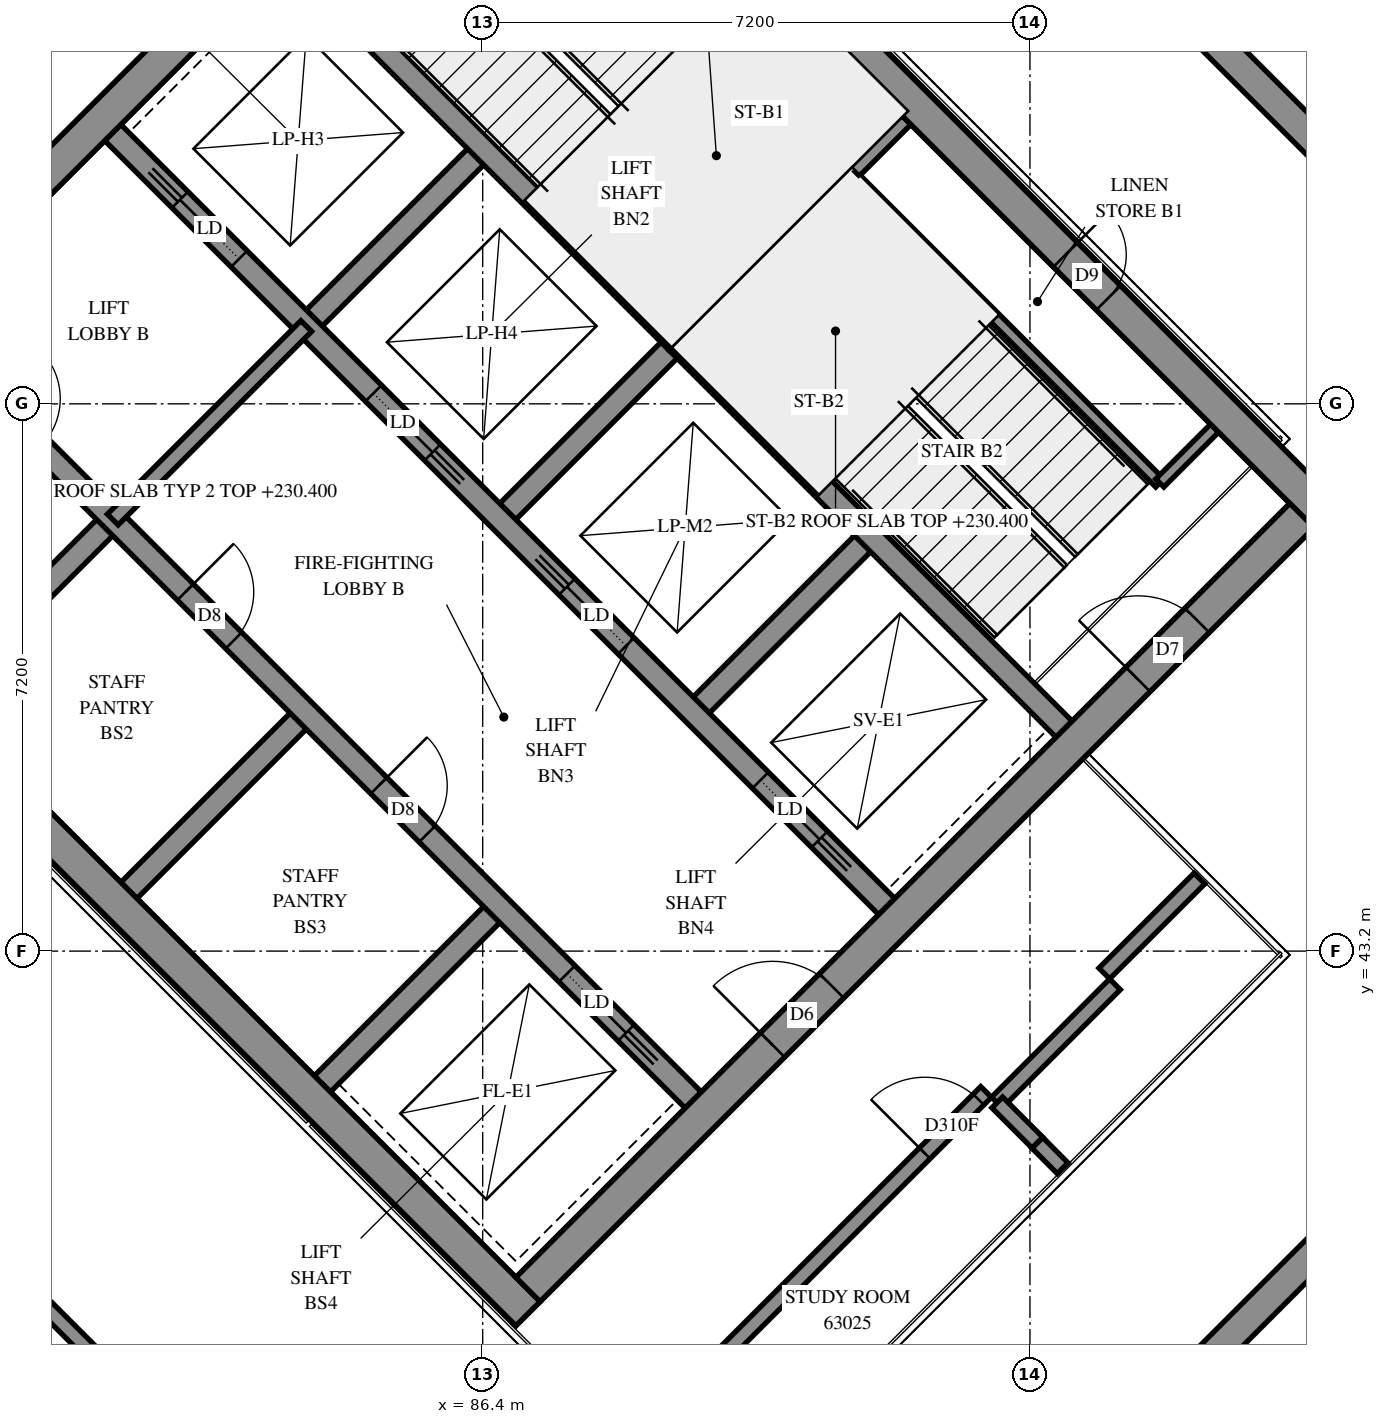
"""IFC4 building model, lengths in metres.
Left out: names, types, materials, properties, quantities, classifications, styles, units other than length and angle.
Written with IfcOpenShell. Run it as: python <this file> out.ifc"""

import sys

from ifc_helpers import new_model, si_unit, direction, frame, frame_2d, origin, place, context, subcontext, project, spatial, polyline, rectangle, outline, extrude, element, fill, save


model = new_model("IFC4")
c1 = context("Model", 3, precision=1e-05, world=origin(), true_north=direction((0.0, 1.0)))
c2 = subcontext(c1, "Body", "Model", "MODEL_VIEW")
j1 = project(units=[si_unit("LENGTHUNIT", "METRE"), si_unit("PLANEANGLEUNIT", "RADIAN")], contexts=[c1])
p1 = place(None, origin())
s1 = spatial("IfcSite", under=j1, at=p1, CompositionType="ELEMENT")
p2 = place(p1, origin())
s2 = spatial("IfcBuilding", under=s1, at=p2, CompositionType="ELEMENT")
p3 = place(p2, frame((0.0, 0.0, 230.4)))
s3 = spatial("IfcBuildingStorey", under=s2, at=p3, CompositionType="ELEMENT", Elevation=230.4)
p4 = place(p3, frame((76.177, 49.249, -0.3), z_axis=(0.0, 0.0, 1.0), x_axis=(0.7071100491, -0.7071035132, 0.0)))
e1 = element("IfcWall", 1, at=p4, inside=s3, PredefinedType="SHEAR", context=c2, shape_type="SweptSolid", body=[
    extrude(rectangle(XDim=15.3, YDim=0.45, at=frame_2d((7.65, 0.0))), origin(), (0.0, 0.0, 1.0), 3.5),
])
p5 = place(p3, frame((86.678, 59.749, -0.3), z_axis=(0.0, 0.0, 1.0), x_axis=(0.7071035132, -0.7071100491, 0.0)))
e2 = element("IfcWall", 2, at=p5, inside=s3, PredefinedType="SHEAR", context=c2, shape_type="SweptSolid", body=[
    extrude(rectangle(XDim=15.3, YDim=0.45, at=frame_2d((7.65, 0.0))), origin(), (0.0, 0.0, 1.0), 3.5),
])
p6 = place(p5, frame((10.45, 0.0, 0.3)))
e3 = element("IfcOpeningElement", 3, at=p6, cuts=e2, PredefinedType="OPENING", context=c2, shape_type="SweptSolid", body=[
    extrude(rectangle(XDim=0.8, YDim=2.1, at=frame_2d((0.4, 1.05))), frame((0.0, 0.235, 0.0), z_axis=(0.0, -1.0, 0.0), x_axis=(1.0, 0.0, 0.0)), (0.0, 0.0, 1.0), 0.47),
])
p7 = place(p3, frame((76.495, 49.249, -0.3), z_axis=(0.0, 0.0, 1.0), x_axis=(0.7071067812, 0.7071067812, 0.0)))
e4 = element("IfcWall", 4, at=p7, inside=s3, PredefinedType="SHEAR", context=c2, shape_type="SweptSolid", body=[
    extrude(rectangle(XDim=14.4, YDim=0.45, at=frame_2d((7.2, 0.0))), origin(), (0.0, 0.0, 1.0), 3.5),
])
p8 = place(p7, frame((4.55, 0.0, 0.3)))
e5 = element("IfcOpeningElement", 5, at=p8, cuts=e4, PredefinedType="OPENING", context=c2, shape_type="SweptSolid", body=[
    extrude(rectangle(XDim=1.1, YDim=2.1, at=frame_2d((0.55, 1.05))), frame((0.0, 0.235, 0.0), z_axis=(0.0, -1.0, 0.0), x_axis=(1.0, 0.0, 0.0)), (0.0, 0.0, 1.0), 0.47),
])
p9 = place(p7, frame((11.35, 0.0, 0.3)))
e6 = element("IfcOpeningElement", 6, at=p9, cuts=e4, PredefinedType="OPENING", context=c2, shape_type="SweptSolid", body=[
    extrude(rectangle(XDim=1.1, YDim=2.1, at=frame_2d((0.55, 1.05))), frame((0.0, 0.235, 0.0), z_axis=(0.0, -1.0, 0.0), x_axis=(1.0, 0.0, 0.0)), (0.0, 0.0, 1.0), 0.47),
])
p10 = place(p3, frame((86.996, 38.748, -0.3), z_axis=(0.0, 0.0, 1.0), x_axis=(0.7071067812, 0.7071067812, 0.0)))
e7 = element("IfcWall", 7, at=p10, inside=s3, PredefinedType="SHEAR", context=c2, shape_type="SweptSolid", body=[
    extrude(rectangle(XDim=14.4, YDim=0.45, at=frame_2d((7.2, 0.0))), origin(), (0.0, 0.0, 1.0), 3.5),
])
p11 = place(p10, frame((4.55, 0.0, 0.3)))
e8 = element("IfcOpeningElement", 8, at=p11, cuts=e7, PredefinedType="OPENING", context=c2, shape_type="SweptSolid", body=[
    extrude(rectangle(XDim=1.1, YDim=2.1, at=frame_2d((0.55, 1.05))), frame((0.0, 0.235, 0.0), z_axis=(0.0, -1.0, 0.0), x_axis=(1.0, 0.0, 0.0)), (0.0, 0.0, 1.0), 0.47),
])
p12 = place(p10, frame((11.35, 0.0, 0.3)))
e9 = element("IfcOpeningElement", 9, at=p12, cuts=e7, PredefinedType="OPENING", context=c2, shape_type="SweptSolid", body=[
    extrude(rectangle(XDim=1.1, YDim=2.1, at=frame_2d((0.55, 1.05))), frame((0.0, 0.235, 0.0), z_axis=(0.0, -1.0, 0.0), x_axis=(1.0, 0.0, 0.0)), (0.0, 0.0, 1.0), 0.47),
])
for number, where, z_axis, x_axis in (
    (10, (79.2, 46.544, 0.0), (0.0, 0.0, 1.0), (0.707, 0.707, 0.0)),
    (11, (84.079, 51.423, 0.0), (0.0, 0.0, 1.0), (0.707, 0.707, 0.0)),
):
    element("IfcWall", number, at=place(p3, frame(where, z_axis=z_axis, x_axis=x_axis)), inside=s3, PredefinedType="SOLIDWALL", context=c2, shape_type="SweptSolid", body=[
        extrude(rectangle(XDim=3.3, YDim=0.3, at=frame_2d((1.65, 0.0))), origin(), (0.0, 0.0, 1.0), 3.9),
    ])
p13 = place(p3, frame((81.746, 43.999, 0.0), z_axis=(0.0, 0.0, 1.0), x_axis=(0.7071067812, 0.7071067812, 0.0)))
e12 = element("IfcWall", 12, at=p13, inside=s3, PredefinedType="SOLIDWALL", context=c2, shape_type="SweptSolid", body=[
    extrude(rectangle(XDim=3.3, YDim=0.3, at=frame_2d((1.65, 0.0))), origin(), (0.0, 0.0, 1.0), 3.9),
])
p14 = place(p3, frame((86.625, 48.878, 0.0), z_axis=(0.0, 0.0, 1.0), x_axis=(0.7071067812, 0.7071067812, 0.0)))
e13 = element("IfcWall", 13, at=p14, inside=s3, PredefinedType="SOLIDWALL", context=c2, shape_type="SweptSolid", body=[
    extrude(rectangle(XDim=3.3, YDim=0.3, at=frame_2d((1.65, 0.0))), origin(), (0.0, 0.0, 1.0), 3.9),
])
p15 = place(p3, frame((84.291, 41.453, 0.0), z_axis=(0.0, 0.0, 1.0), x_axis=(0.7071067812, 0.7071067812, 0.0)))
e14 = element("IfcWall", 14, at=p15, inside=s3, PredefinedType="SOLIDWALL", context=c2, shape_type="SweptSolid", body=[
    extrude(rectangle(XDim=3.3, YDim=0.3, at=frame_2d((1.65, 0.0))), origin(), (0.0, 0.0, 1.0), 3.9),
])
p16 = place(p3, frame((89.17, 46.332, 0.0), z_axis=(0.0, 0.0, 1.0), x_axis=(0.7071067812, 0.7071067812, 0.0)))
e15 = element("IfcWall", 15, at=p16, inside=s3, PredefinedType="SOLIDWALL", context=c2, shape_type="SweptSolid", body=[
    extrude(rectangle(XDim=3.3, YDim=0.3, at=frame_2d((1.65, 0.0))), origin(), (0.0, 0.0, 1.0), 3.9),
])
p17 = place(p3, frame((78.988, 51.423, 0.0), z_axis=(0.0, 0.0, 1.0), x_axis=(0.7071067812, -0.7071067812, 0.0)))
e16 = element("IfcWall", 16, at=p17, inside=s3, PredefinedType="SOLIDWALL", context=c2, shape_type="SweptSolid", body=[
    extrude(rectangle(XDim=14.4, YDim=0.3, at=frame_2d((7.2, 0.0))), origin(), (0.0, 0.0, 1.0), 3.9),
])
p18 = place(p17, frame((1.35, 0.0, 0.0)))
e17 = element("IfcOpeningElement", 17, at=p18, cuts=e16, PredefinedType="OPENING", context=c2, shape_type="SweptSolid", body=[
    extrude(rectangle(XDim=0.9, YDim=2.1, at=frame_2d((0.45, 1.05))), frame((0.0, 0.16, 0.0), z_axis=(0.0, -1.0, 0.0), x_axis=(1.0, 0.0, 0.0)), (0.0, 0.0, 1.0), 0.32),
])
p19 = place(p17, frame((4.95, 0.0, 0.0)))
e18 = element("IfcOpeningElement", 18, at=p19, cuts=e16, PredefinedType="OPENING", context=c2, shape_type="SweptSolid", body=[
    extrude(rectangle(XDim=0.9, YDim=2.1, at=frame_2d((0.45, 1.05))), frame((0.0, 0.16, 0.0), z_axis=(0.0, -1.0, 0.0), x_axis=(1.0, 0.0, 0.0)), (0.0, 0.0, 1.0), 0.32),
])
p20 = place(p17, frame((8.55, 0.0, 0.0)))
e19 = element("IfcOpeningElement", 19, at=p20, cuts=e16, PredefinedType="OPENING", context=c2, shape_type="SweptSolid", body=[
    extrude(rectangle(XDim=0.9, YDim=2.1, at=frame_2d((0.45, 1.05))), frame((0.0, 0.16, 0.0), z_axis=(0.0, -1.0, 0.0), x_axis=(1.0, 0.0, 0.0)), (0.0, 0.0, 1.0), 0.32),
])
p21 = place(p17, frame((12.05, 0.0, 0.0)))
e20 = element("IfcOpeningElement", 20, at=p21, cuts=e16, PredefinedType="OPENING", context=c2, shape_type="SweptSolid", body=[
    extrude(rectangle(XDim=1.1, YDim=2.1, at=frame_2d((0.55, 1.05))), frame((0.0, 0.16, 0.0), z_axis=(0.0, -1.0, 0.0), x_axis=(1.0, 0.0, 0.0)), (0.0, 0.0, 1.0), 0.32),
])
p22 = place(p3, frame((81.534, 53.969, 0.0), z_axis=(0.0, 0.0, 1.0), x_axis=(0.707103309, -0.7071102534, 0.0)))
e21 = element("IfcWall", 21, at=p22, inside=s3, PredefinedType="SOLIDWALL", context=c2, shape_type="SweptSolid", body=[
    extrude(rectangle(XDim=14.4, YDim=0.3, at=frame_2d((7.2, 0.0))), origin(), (0.0, 0.0, 1.0), 3.9),
])
p23 = place(p22, frame((1.25, 0.0, 0.0)))
e22 = element("IfcOpeningElement", 22, at=p23, cuts=e21, PredefinedType="OPENING", context=c2, shape_type="SweptSolid", body=[
    extrude(rectangle(XDim=1.1, YDim=2.1, at=frame_2d((0.55, 1.05))), frame((0.0, 0.16, 0.0), z_axis=(0.0, -1.0, 0.0), x_axis=(1.0, 0.0, 0.0)), (0.0, 0.0, 1.0), 0.32),
])
p24 = place(p22, frame((4.85, 0.0, 0.0)))
e23 = element("IfcOpeningElement", 23, at=p24, cuts=e21, PredefinedType="OPENING", context=c2, shape_type="SweptSolid", body=[
    extrude(rectangle(XDim=1.1, YDim=2.1, at=frame_2d((0.55, 1.05))), frame((0.0, 0.16, 0.0), z_axis=(0.0, -1.0, 0.0), x_axis=(1.0, 0.0, 0.0)), (0.0, 0.0, 1.0), 0.32),
])
p25 = place(p22, frame((8.45, 0.0, 0.0)))
e24 = element("IfcOpeningElement", 24, at=p25, cuts=e21, PredefinedType="OPENING", context=c2, shape_type="SweptSolid", body=[
    extrude(rectangle(XDim=1.1, YDim=2.1, at=frame_2d((0.55, 1.05))), frame((0.0, 0.16, 0.0), z_axis=(0.0, -1.0, 0.0), x_axis=(1.0, 0.0, 0.0)), (0.0, 0.0, 1.0), 0.32),
])
p26 = place(p22, frame((12.05, 0.0, 0.0)))
e25 = element("IfcOpeningElement", 25, at=p26, cuts=e21, PredefinedType="OPENING", context=c2, shape_type="SweptSolid", body=[
    extrude(rectangle(XDim=1.1, YDim=2.1, at=frame_2d((0.55, 1.05))), frame((0.0, 0.16, 0.0), z_axis=(0.0, -1.0, 0.0), x_axis=(1.0, 0.0, 0.0)), (0.0, 0.0, 1.0), 0.32),
])
for number, where, z_axis, x_axis in (
    (26, (83.867, 56.302, 0.0), (0.0, 0.0, 1.0), (0.707, -0.707, 0.0)),
    (27, (88.958, 51.211, 0.0), (0.0, 0.0, 1.0), (0.707, -0.707, 0.0)),
):
    element("IfcWall", number, at=place(p3, frame(where, z_axis=z_axis, x_axis=x_axis)), inside=s3, PredefinedType="SOLIDWALL", context=c2, shape_type="SweptSolid", body=[
        extrude(rectangle(XDim=7.2, YDim=0.3, at=frame_2d((3.6, 0.0))), origin(), (0.0, 0.0, 1.0), 3.9),
    ])
p27 = place(p3, frame((88.958, 51.211, 0.0), z_axis=(0.0, 0.0, 1.0), x_axis=(0.7071067812, 0.7071067812, 0.0)))
e28 = element("IfcWall", 28, at=p27, inside=s3, PredefinedType="SOLIDWALL", context=c2, shape_type="SweptSolid", body=[
    extrude(rectangle(XDim=4.2, YDim=0.3, at=frame_2d((2.1, 0.0))), origin(), (0.0, 0.0, 1.0), 3.9),
])
p28 = place(p3, frame((102.747, 49.938, 0.0), z_axis=(0.0, 0.0, 1.0), x_axis=(-0.7071083109, 0.7071052514, 0.0)))
e29 = element("IfcWall", 29, at=p28, inside=s3, PredefinedType="SOLIDWALL", context=c2, shape_type="SweptSolid", body=[
    extrude(outline(polyline([(-0.1, -0.1), (32.726, -0.1), (32.644, 0.1), (0.1, 0.1), (-0.1, -0.1)])), origin(), (0.0, 0.0, 1.0), 4.2),
])
p29 = place(p3, frame((77.018, 42.15, 0.0), z_axis=(0.0, 0.0, 1.0), x_axis=(0.7071039217, -0.7071096407, 0.0)))
e30 = element("IfcWall", 30, at=p29, inside=s3, PredefinedType="SOLIDWALL", context=c2, shape_type="SweptSolid", body=[
    extrude(outline(polyline([(0.041, -0.1), (17.586, -0.1), (17.386, 0.1), (-0.041, 0.1), (0.041, -0.1)])), origin(), (0.0, 0.0, 1.0), 4.2),
])
p30 = place(p3, frame((89.382, 29.786, 0.0), z_axis=(0.0, 0.0, 1.0), x_axis=(0.7071094267, 0.7071041357, 0.0)))
e31 = element("IfcWall", 31, at=p30, inside=s3, PredefinedType="SOLIDWALL", context=c2, shape_type="SweptSolid", body=[
    extrude(outline(polyline([(-0.1, -0.1), (19.0, -0.1), (18.8, 0.1), (0.1, 0.1), (-0.1, -0.1)])), origin(), (0.0, 0.0, 1.0), 4.2),
])
p31 = place(p3, frame((91.313, 53.354, 0.0), z_axis=(0.0, 0.0, 1.0), x_axis=(0.7071067812, -0.7071067812, 0.0)))
e32 = element("IfcWall", 32, at=p31, inside=s3, PredefinedType="PARTITIONING", context=c2, shape_type="SweptSolid", body=[
    extrude(rectangle(XDim=5.65, YDim=0.15, at=frame_2d((2.825, 0.0))), origin(), (0.0, 0.0, 1.0), 3.9),
])
p32 = place(p3, frame((95.308, 49.358, 0.0), z_axis=(0.0, 0.0, 1.0), x_axis=(0.70705776, 0.707155799, 0.0)))
e33 = element("IfcWall", 33, at=p32, inside=s3, PredefinedType="PARTITIONING", context=c2, shape_type="SweptSolid", body=[
    extrude(rectangle(XDim=1.02, YDim=0.15, at=frame_2d((0.51, 0.0))), origin(), (0.0, 0.0, 1.0), 3.9),
])
p33 = place(p3, frame((81.534, 48.878, 0.0), z_axis=(0.0, 0.0, 1.0), x_axis=(0.707092892, 0.7071206701, 0.0)))
e34 = element("IfcWall", 34, at=p33, inside=s3, PredefinedType="PARTITIONING", context=c2, shape_type="SweptSolid", body=[
    extrude(rectangle(XDim=3.6, YDim=0.2, at=frame_2d((1.8, 0.0))), origin(), (0.0, 0.0, 1.0), 3.9),
])
p34 = place(p3, frame((88.377, 36.701, 0.0), z_axis=(0.0, 0.0, 1.0), x_axis=(0.7071067812, 0.7071067812, 0.0)))
e35 = element("IfcWall", 35, at=p34, inside=s3, PredefinedType="PARTITIONING", context=c2, shape_type="SweptSolid", body=[
    extrude(rectangle(XDim=6.57, YDim=0.2, at=frame_2d((3.285, 0.0))), origin(), (0.0, 0.0, 1.0), 3.9),
])
p35 = place(p34, frame((5.43, 0.0, 0.0)))
e36 = element("IfcOpeningElement", 36, at=p35, cuts=e35, PredefinedType="OPENING", context=c2, shape_type="SweptSolid", body=[
    extrude(rectangle(XDim=1.0, YDim=2.1, at=frame_2d((0.5, 1.05))), frame((0.0, 0.11, 0.0), z_axis=(0.0, -1.0, 0.0), x_axis=(1.0, 0.0, 0.0)), (0.0, 0.0, 1.0), 0.22),
])
p36 = place(p3, frame((93.164, 41.208, 0.0), z_axis=(0.0, 0.0, 1.0), x_axis=(0.706651904, 0.7075613659, 0.0)))
e37 = element("IfcWall", 37, at=p36, inside=s3, PredefinedType="PARTITIONING", context=c2, shape_type="SweptSolid", body=[
    extrude(rectangle(XDim=2.199, YDim=0.2, at=frame_2d((1.1, 0.0))), origin(), (0.0, 0.0, 1.0), 3.9),
])
p37 = place(p3, frame((94.578, 42.906, 0.0), z_axis=(0.0, 0.0, 1.0), x_axis=(0.7076717883, 0.7065413222, 0.0)))
e38 = element("IfcWall", 38, at=p37, inside=s3, PredefinedType="PARTITIONING", context=c2, shape_type="SweptSolid", body=[
    extrude(rectangle(XDim=1.769, YDim=0.2, at=frame_2d((0.885, 0.0))), origin(), (0.0, 0.0, 1.0), 3.9),
])
p38 = place(p3, frame((93.169, 41.209, 0.0), z_axis=(0.0, 0.0, 1.0), x_axis=(0.7071067812, -0.7071067812, 0.0)))
e39 = element("IfcWall", 39, at=p38, inside=s3, PredefinedType="PARTITIONING", context=c2, shape_type="SweptSolid", body=[
    extrude(rectangle(XDim=0.75, YDim=0.2, at=frame_2d((0.375, 0.0))), origin(), (0.0, 0.0, 1.0), 3.9),
])
p39 = place(p3, frame((93.698, 40.678, 0.0), z_axis=(0.0, 0.0, 1.0), x_axis=(0.7049801586, -0.7092270271, 0.0)))
e40 = element("IfcWall", 40, at=p39, inside=s3, PredefinedType="PARTITIONING", context=c2, shape_type="SweptSolid", body=[
    extrude(rectangle(XDim=0.471, YDim=0.2, at=frame_2d((0.235, 0.0))), origin(), (0.0, 0.0, 1.0), 3.9),
])
p40 = place(p6, origin())
e41 = element("IfcDoor", 41, at=p40, inside=s3, OperationType="SINGLE_SWING_RIGHT", PredefinedType="DOOR", context=c2, shape_type="SweptSolid", body=[
    extrude(rectangle(XDim=0.8, YDim=2.1, at=frame_2d((0.4, 1.05))), frame((0.0, 0.025, 0.0), z_axis=(0.0, -1.0, 0.0), x_axis=(1.0, 0.0, 0.0)), (0.0, 0.0, 1.0), 0.05),
])
fill(e3, e41)
p41 = place(p11, origin())
e42 = element("IfcDoor", 42, at=p41, inside=s3, OperationType="DOUBLE_DOOR_SINGLE_SWING", PredefinedType="DOOR", context=c2, shape_type="SweptSolid", body=[
    extrude(rectangle(XDim=1.1, YDim=2.1, at=frame_2d((0.55, 1.05))), frame((0.0, 0.025, 0.0), z_axis=(0.0, -1.0, 0.0), x_axis=(1.0, 0.0, 0.0)), (0.0, 0.0, 1.0), 0.05),
])
fill(e8, e42)
p42 = place(p12, origin())
e43 = element("IfcDoor", 43, at=p42, inside=s3, OperationType="SINGLE_SWING_RIGHT", PredefinedType="DOOR", context=c2, shape_type="SweptSolid", body=[
    extrude(rectangle(XDim=1.1, YDim=2.1, at=frame_2d((0.55, 1.05))), frame((0.0, 0.025, 0.0), z_axis=(0.0, -1.0, 0.0), x_axis=(1.0, 0.0, 0.0)), (0.0, 0.0, 1.0), 0.05),
])
fill(e9, e43)
p43 = place(p19, origin())
e44 = element("IfcDoor", 44, at=p43, inside=s3, OperationType="SINGLE_SWING_LEFT", PredefinedType="DOOR", context=c2, shape_type="SweptSolid", body=[
    extrude(rectangle(XDim=0.9, YDim=2.1, at=frame_2d((0.45, 1.05))), frame((0.0, 0.025, 0.0), z_axis=(0.0, -1.0, 0.0), x_axis=(1.0, 0.0, 0.0)), (0.0, 0.0, 1.0), 0.05),
])
fill(e18, e44)
p44 = place(p20, origin())
e45 = element("IfcDoor", 45, at=p44, inside=s3, OperationType="SINGLE_SWING_LEFT", PredefinedType="DOOR", context=c2, shape_type="SweptSolid", body=[
    extrude(rectangle(XDim=0.9, YDim=2.1, at=frame_2d((0.45, 1.05))), frame((0.0, 0.025, 0.0), z_axis=(0.0, -1.0, 0.0), x_axis=(1.0, 0.0, 0.0)), (0.0, 0.0, 1.0), 0.05),
])
fill(e19, e45)
p45 = place(p21, origin())
e46 = element("IfcDoor", 46, at=p45, inside=s3, OperationType="SLIDING_TO_RIGHT", PredefinedType="DOOR", context=c2, shape_type="SweptSolid", body=[
    extrude(rectangle(XDim=1.1, YDim=2.1, at=frame_2d((0.55, 1.05))), frame((0.0, 0.025, 0.0), z_axis=(0.0, -1.0, 0.0), x_axis=(1.0, 0.0, 0.0)), (0.0, 0.0, 1.0), 0.05),
])
fill(e20, e46)
p46 = place(p23, origin())
e47 = element("IfcDoor", 47, at=p46, inside=s3, OperationType="SLIDING_TO_LEFT", PredefinedType="DOOR", context=c2, shape_type="SweptSolid", body=[
    extrude(rectangle(XDim=1.1, YDim=2.1, at=frame_2d((0.55, 1.05))), frame((0.0, 0.025, 0.0), z_axis=(0.0, -1.0, 0.0), x_axis=(1.0, 0.0, 0.0)), (0.0, 0.0, 1.0), 0.05),
])
fill(e22, e47)
p47 = place(p24, origin())
e48 = element("IfcDoor", 48, at=p47, inside=s3, OperationType="SLIDING_TO_RIGHT", PredefinedType="DOOR", context=c2, shape_type="SweptSolid", body=[
    extrude(rectangle(XDim=1.1, YDim=2.1, at=frame_2d((0.55, 1.05))), frame((0.0, 0.025, 0.0), z_axis=(0.0, -1.0, 0.0), x_axis=(1.0, 0.0, 0.0)), (0.0, 0.0, 1.0), 0.05),
])
fill(e23, e48)
p48 = place(p25, origin())
e49 = element("IfcDoor", 49, at=p48, inside=s3, OperationType="SLIDING_TO_LEFT", PredefinedType="DOOR", context=c2, shape_type="SweptSolid", body=[
    extrude(rectangle(XDim=1.1, YDim=2.1, at=frame_2d((0.55, 1.05))), frame((0.0, 0.025, 0.0), z_axis=(0.0, -1.0, 0.0), x_axis=(1.0, 0.0, 0.0)), (0.0, 0.0, 1.0), 0.05),
])
fill(e24, e49)
p49 = place(p26, origin())
e50 = element("IfcDoor", 50, at=p49, inside=s3, OperationType="SLIDING_TO_RIGHT", PredefinedType="DOOR", context=c2, shape_type="SweptSolid", body=[
    extrude(rectangle(XDim=1.1, YDim=2.1, at=frame_2d((0.55, 1.05))), frame((0.0, 0.025, 0.0), z_axis=(0.0, -1.0, 0.0), x_axis=(1.0, 0.0, 0.0)), (0.0, 0.0, 1.0), 0.05),
])
fill(e25, e50)
p50 = place(p35, origin())
e51 = element("IfcDoor", 51, at=p50, inside=s3, OperationType="SINGLE_SWING_LEFT", PredefinedType="DOOR", context=c2, shape_type="SweptSolid", body=[
    extrude(rectangle(XDim=1.0, YDim=2.1, at=frame_2d((0.5, 1.05))), frame((0.0, 0.025, 0.0), z_axis=(0.0, -1.0, 0.0), x_axis=(1.0, 0.0, 0.0)), (0.0, 0.0, 1.0), 0.05),
])
fill(e36, e51)
save(model, sys.argv[1])
